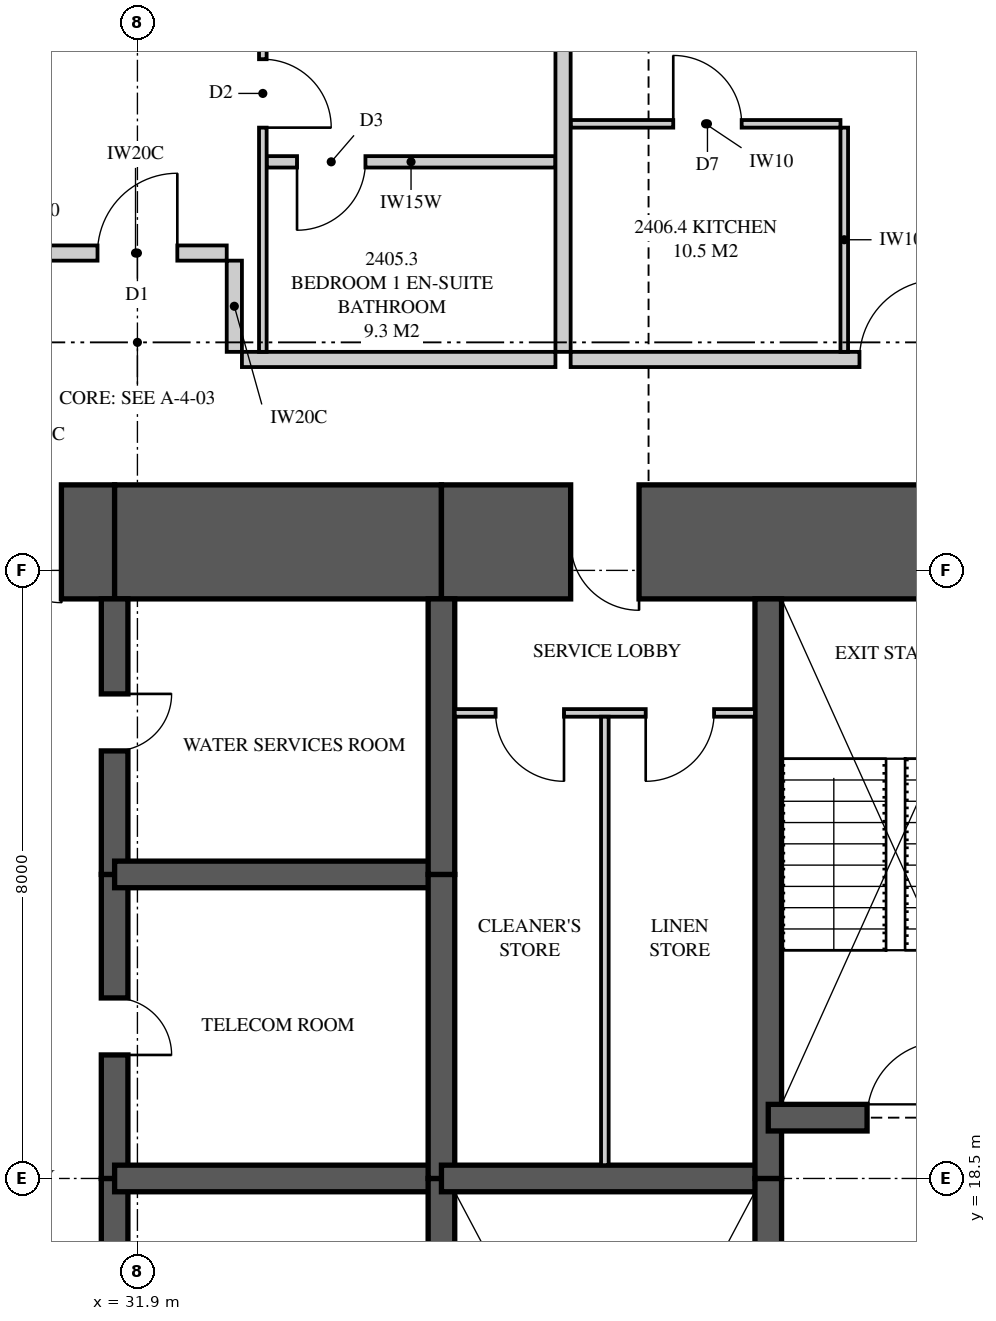
"""IFC4 building model, lengths in metres.
Left out: names, types, materials, properties, quantities, classifications, styles, units other than length and angle.
Written with IfcOpenShell. Run it as: python <this file> out.ifc"""

import sys

from ifc_helpers import new_model, si_unit, direction, frame, frame_2d, origin, place, context, subcontext, project, spatial, polyline, rectangle, outline, extrude, element, fill, save


model = new_model("IFC4")
c1 = context("Model", 3, precision=1e-05, world=origin(), true_north=direction((0.0, 1.0)))
c2 = subcontext(c1, "Body", "Model", "MODEL_VIEW")
j1 = project(units=[si_unit("LENGTHUNIT", "METRE"), si_unit("PLANEANGLEUNIT", "RADIAN")], contexts=[c1])
p1 = place(None, origin())
s1 = spatial("IfcSite", under=j1, at=p1, CompositionType="ELEMENT")
p2 = place(p1, origin())
s2 = spatial("IfcBuilding", under=s1, at=p2, CompositionType="ELEMENT")
p3 = place(p2, frame((0.0, 0.0, 91.45)))
s3 = spatial("IfcBuildingStorey", under=s2, at=p3, CompositionType="ELEMENT", Elevation=91.45)
p4 = place(p3, frame((44.225, 26.875, 0.0), z_axis=(0.0, 0.0, 1.0), x_axis=(-1.0, 0.0, 0.0)))
e1 = element("IfcWall", 1, at=p4, inside=s3, PredefinedType="SHEAR", context=c2, shape_type="SweptSolid", body=[
    extrude(rectangle(XDim=8.325, YDim=1.5, at=frame_2d((4.163, 0.0))), origin(), (0.0, 0.0, 1.0), 3.35),
])
p5 = place(p4, frame((5.725, 0.0, 0.0)))
e2 = element("IfcOpeningElement", 2, at=p5, cuts=e1, PredefinedType="OPENING", context=c2, shape_type="SweptSolid", body=[
    extrude(rectangle(XDim=0.9, YDim=2.1, at=frame_2d((0.45, 1.05))), frame((0.0, 0.76, 0.0), z_axis=(0.0, -1.0, 0.0), x_axis=(1.0, 0.0, 0.0)), (0.0, 0.0, 1.0), 1.52),
])
p6 = place(p3, frame((35.9, 26.875, 0.0), z_axis=(0.0, 0.0, 1.0), x_axis=(-1.0, 0.0, 0.0)))
e3 = element("IfcWall", 3, at=p6, inside=s3, PredefinedType="SHEAR", context=c2, shape_type="SweptSolid", body=[
    extrude(rectangle(XDim=4.3, YDim=1.5, at=frame_2d((2.15, 0.0))), origin(), (0.0, 0.0, 1.0), 3.35),
])
p7 = place(p3, frame((31.6, 26.875, 0.0), z_axis=(0.0, 0.0, 1.0), x_axis=(-1.0, 0.0, 0.0)))
e4 = element("IfcWall", 4, at=p7, inside=s3, PredefinedType="SHEAR", context=c2, shape_type="SweptSolid", body=[
    extrude(rectangle(XDim=5.6, YDim=1.5, at=frame_2d((2.8, 0.0))), origin(), (0.0, 0.0, 1.0), 3.35),
])
p8 = place(p7, frame((0.7, 0.0, 0.0)))
e5 = element("IfcOpeningElement", 5, at=p8, cuts=e4, PredefinedType="OPENING", context=c2, shape_type="SweptSolid", body=[
    extrude(rectangle(XDim=1.6, YDim=2.1, at=frame_2d((0.8, 1.05))), frame((0.0, 0.76, 0.0), z_axis=(0.0, -1.0, 0.0), x_axis=(1.0, 0.0, 0.0)), (0.0, 0.0, 1.0), 1.52),
])
p9 = place(p3, frame((31.6, 14.5, 0.0), z_axis=(0.0, 0.0, 1.0), x_axis=(0.0, 1.0, 0.0)))
e6 = element("IfcWall", 6, at=p9, inside=s3, PredefinedType="SHEAR", context=c2, shape_type="SweptSolid", body=[
    extrude(rectangle(XDim=4.0, YDim=0.35, at=frame_2d((2.0, 0.0))), origin(), (0.0, 0.0, 1.0), 3.35),
])
p10 = place(p9, frame((1.625, 0.0, 0.0)))
e7 = element("IfcOpeningElement", 7, at=p10, cuts=e6, PredefinedType="OPENING", context=c2, shape_type="SweptSolid", body=[
    extrude(rectangle(XDim=0.75, YDim=2.1, at=frame_2d((0.375, 1.05))), frame((0.0, 0.185, 0.0), z_axis=(0.0, -1.0, 0.0), x_axis=(1.0, 0.0, 0.0)), (0.0, 0.0, 1.0), 0.37),
])
p11 = place(p3, frame((31.6, 18.5, 0.0), z_axis=(0.0, 0.0, 1.0), x_axis=(0.0, 1.0, 0.0)))
e8 = element("IfcWall", 8, at=p11, inside=s3, PredefinedType="SHEAR", context=c2, shape_type="SweptSolid", body=[
    extrude(rectangle(XDim=4.0, YDim=0.35, at=frame_2d((2.0, 0.0))), origin(), (0.0, 0.0, 1.0), 3.35),
])
p12 = place(p11, frame((1.625, 0.0, 0.0)))
e9 = element("IfcOpeningElement", 9, at=p12, cuts=e8, PredefinedType="OPENING", context=c2, shape_type="SweptSolid", body=[
    extrude(rectangle(XDim=0.75, YDim=2.1, at=frame_2d((0.375, 1.05))), frame((0.0, 0.185, 0.0), z_axis=(0.0, -1.0, 0.0), x_axis=(1.0, 0.0, 0.0)), (0.0, 0.0, 1.0), 0.37),
])
p13 = place(p3, frame((31.6, 22.5, 0.0), z_axis=(0.0, 0.0, 1.0), x_axis=(0.0, 1.0, 0.0)))
e10 = element("IfcWall", 10, at=p13, inside=s3, PredefinedType="SHEAR", context=c2, shape_type="SweptSolid", body=[
    extrude(rectangle(XDim=3.625, YDim=0.35, at=frame_2d((1.812, 0.0))), origin(), (0.0, 0.0, 1.0), 3.35),
])
p14 = place(p13, frame((1.625, 0.0, 0.0)))
e11 = element("IfcOpeningElement", 11, at=p14, cuts=e10, PredefinedType="OPENING", context=c2, shape_type="SweptSolid", body=[
    extrude(rectangle(XDim=0.75, YDim=2.1, at=frame_2d((0.375, 1.05))), frame((0.0, 0.185, 0.0), z_axis=(0.0, -1.0, 0.0), x_axis=(1.0, 0.0, 0.0)), (0.0, 0.0, 1.0), 0.37),
])
for number, where, z_axis, x_axis in (
    (12, (35.9, 14.5, 0.0), (0.0, 0.0, 1.0), (0.0, 1.0, 0.0)),
    (13, (35.9, 18.5, 0.0), (0.0, 0.0, 1.0), (0.0, 1.0, 0.0)),
):
    element("IfcWall", number, at=place(p3, frame(where, z_axis=z_axis, x_axis=x_axis)), inside=s3, PredefinedType="SHEAR", context=c2, shape_type="SweptSolid", body=[
        extrude(rectangle(XDim=4.0, YDim=0.35, at=frame_2d((2.0, 0.0))), origin(), (0.0, 0.0, 1.0), 3.35),
    ])
p15 = place(p3, frame((35.9, 22.5, 0.0), z_axis=(0.0, 0.0, 1.0), x_axis=(0.0, 1.0, 0.0)))
e14 = element("IfcWall", 14, at=p15, inside=s3, PredefinedType="SHEAR", context=c2, shape_type="SweptSolid", body=[
    extrude(rectangle(XDim=3.625, YDim=0.35, at=frame_2d((1.812, 0.0))), origin(), (0.0, 0.0, 1.0), 3.35),
])
p16 = place(p3, frame((40.2, 13.7, 0.0), z_axis=(0.0, 0.0, 1.0), x_axis=(0.0, 1.0, 0.0)))
e15 = element("IfcWall", 15, at=p16, inside=s3, PredefinedType="SHEAR", context=c2, shape_type="SweptSolid", body=[
    extrude(rectangle(XDim=4.8, YDim=0.35, at=frame_2d((2.4, 0.0))), origin(), (0.0, 0.0, 1.0), 3.35),
])
p17 = place(p3, frame((40.2, 18.5, 0.0), z_axis=(0.0, 0.0, 1.0), x_axis=(0.0, 1.0, 0.0)))
e16 = element("IfcWall", 16, at=p17, inside=s3, PredefinedType="SHEAR", context=c2, shape_type="SweptSolid", body=[
    extrude(rectangle(XDim=7.625, YDim=0.35, at=frame_2d((3.812, 0.0))), origin(), (0.0, 0.0, 1.0), 3.35),
])
for number, where, z_axis, x_axis in (
    (17, (31.6, 18.5, 0.0), (0.0, 0.0, 1.0), (1.0, 0.0, 0.0)),
    (18, (31.6, 22.5, 0.0), (0.0, 0.0, 1.0), (1.0, 0.0, 0.0)),
):
    element("IfcWall", number, at=place(p3, frame(where, z_axis=z_axis, x_axis=x_axis)), inside=s3, PredefinedType="SHEAR", context=c2, shape_type="SweptSolid", body=[
        extrude(rectangle(XDim=4.3, YDim=0.35, at=frame_2d((2.15, 0.0))), origin(), (0.0, 0.0, 1.0), 3.35),
    ])
p18 = place(p3, frame((35.9, 18.5, 0.0), z_axis=(0.0, 0.0, 1.0), x_axis=(1.0, 0.0, 0.0)))
e19 = element("IfcWall", 19, at=p18, inside=s3, PredefinedType="SHEAR", context=c2, shape_type="SweptSolid", body=[
    extrude(rectangle(XDim=4.3, YDim=0.35, at=frame_2d((2.15, 0.0))), origin(), (0.0, 0.0, 1.0), 3.35),
])
p19 = place(p3, frame((40.2, 19.3, 0.0), z_axis=(0.0, 0.0, 1.0), x_axis=(1.0, 0.0, 0.0)))
e20 = element("IfcWall", 20, at=p19, inside=s3, PredefinedType="SHEAR", context=c2, shape_type="SweptSolid", body=[
    extrude(rectangle(XDim=3.6, YDim=0.35, at=frame_2d((1.8, 0.0))), origin(), (0.0, 0.0, 1.0), 3.35),
])
p20 = place(p19, frame((1.3, 0.0, 0.0)))
e21 = element("IfcOpeningElement", 21, at=p20, cuts=e20, PredefinedType="OPENING", context=c2, shape_type="SweptSolid", body=[
    extrude(rectangle(XDim=1.0, YDim=2.1, at=frame_2d((0.5, 1.05))), frame((0.0, 0.185, 0.0), z_axis=(0.0, -1.0, 0.0), x_axis=(1.0, 0.0, 0.0)), (0.0, 0.0, 1.0), 0.37),
])
p21 = place(p3, frame((37.5, 37.825, 0.0), z_axis=(0.0, 0.0, 1.0), x_axis=(0.0, -1.0, 0.0)))
e22 = element("IfcWall", 22, at=p21, inside=s3, PredefinedType="PARTITIONING", context=c2, shape_type="SweptSolid", body=[
    extrude(outline(polyline([(0.529, 2.15), (0.0, 2.15), (0.0, 0.0), (0.529, 0.0), (0.529, 0.735), (1.021, 0.735), (1.021, 0.0), (8.45, 0.0), (8.45, 3.11), (1.685, 3.11), (1.685, 2.15), (1.021, 2.15), (1.021, 1.415), (0.529, 1.415), (0.529, 2.15)])), frame((0.0, 0.1, 0.0), z_axis=(0.0, -1.0, 0.0), x_axis=(1.0, 0.0, 0.0)), (0.0, 0.0, 1.0), 0.2),
])
p22 = place(p3, frame((33.55, 37.825, 0.0), z_axis=(0.0, 0.0, 1.0), x_axis=(0.0, -1.0, 0.0)))
e23 = element("IfcWall", 23, at=p22, inside=s3, PredefinedType="PARTITIONING", context=c2, shape_type="SweptSolid", body=[
    extrude(outline(polyline([(0.0, 0.0), (8.45, 0.0), (8.45, 3.11), (1.635, 3.11), (1.635, 2.15), (0.0, 2.15), (0.0, 3.11), (0.0, 0.0)])), frame((0.0, 0.05, 0.0), z_axis=(0.0, -1.0, 0.0), x_axis=(1.0, 0.0, 0.0)), (0.0, 0.0, 1.0), 0.1),
])
p23 = place(p22, frame((4.6, 0.0, 0.0)))
e24 = element("IfcOpeningElement", 24, at=p23, cuts=e23, PredefinedType="OPENING", context=c2, shape_type="SweptSolid", body=[
    extrude(rectangle(XDim=0.9, YDim=2.1, at=frame_2d((0.45, 1.05))), frame((0.0, 0.06, 0.0), z_axis=(0.0, -1.0, 0.0), x_axis=(1.0, 0.0, 0.0)), (0.0, 0.0, 1.0), 0.12),
])
p24 = place(p3, frame((33.6, 31.875, 0.0), z_axis=(0.0, 0.0, 1.0), x_axis=(1.0, 0.0, 0.0)))
e25 = element("IfcWall", 25, at=p24, inside=s3, PredefinedType="PLUMBINGWALL", context=c2, shape_type="SweptSolid", body=[
    extrude(rectangle(XDim=3.8, YDim=0.15, at=frame_2d((1.9, 0.0))), origin(), (0.0, 0.0, 1.0), 3.11),
])
p25 = place(p24, frame((0.4, 0.0, 0.0)))
e26 = element("IfcOpeningElement", 26, at=p25, cuts=e25, PredefinedType="OPENING", context=c2, shape_type="SweptSolid", body=[
    extrude(rectangle(XDim=0.9, YDim=2.1, at=frame_2d((0.45, 1.05))), frame((0.0, 0.085, 0.0), z_axis=(0.0, -1.0, 0.0), x_axis=(1.0, 0.0, 0.0)), (0.0, 0.0, 1.0), 0.17),
])
p26 = place(p3, frame((37.6, 29.275, 0.0), z_axis=(0.0, 0.0, 1.0), x_axis=(1.0, 0.0, 0.0)))
e27 = element("IfcWall", 27, at=p26, inside=s3, PredefinedType="PARTITIONING", context=c2, shape_type="SweptSolid", body=[
    extrude(outline(polyline([(0.0, 0.0), (8.425, 0.0), (8.425, 3.11), (1.362, 3.11), (1.362, 2.541), (0.688, 2.541), (0.688, 3.11), (0.0, 3.11), (0.0, 0.0)])), frame((0.0, 0.1, 0.0), z_axis=(0.0, -1.0, 0.0), x_axis=(1.0, 0.0, 0.0)), (0.0, 0.0, 1.0), 0.2),
])
p27 = place(p26, frame((3.8, 0.0, 0.0)))
e28 = element("IfcOpeningElement", 28, at=p27, cuts=e27, PredefinedType="OPENING", context=c2, shape_type="SweptSolid", body=[
    extrude(rectangle(XDim=1.05, YDim=2.2, at=frame_2d((0.525, 1.1))), frame((0.0, 0.11, 0.0), z_axis=(0.0, -1.0, 0.0), x_axis=(1.0, 0.0, 0.0)), (0.0, 0.0, 1.0), 0.22),
])
p28 = place(p3, frame((37.6, 32.375, 0.0), z_axis=(0.0, 0.0, 1.0), x_axis=(1.0, 0.0, 0.0)))
e29 = element("IfcWall", 29, at=p28, inside=s3, PredefinedType="PARTITIONING", context=c2, shape_type="SweptSolid", body=[
    extrude(outline(polyline([(0.0, 0.0), (3.55, 0.0), (3.55, 3.11), (1.312, 3.11), (1.312, 2.541), (0.738, 2.541), (0.738, 3.11), (0.0, 3.11), (0.0, 0.0)])), frame((0.0, 0.05, 0.0), z_axis=(0.0, -1.0, 0.0), x_axis=(1.0, 0.0, 0.0)), (0.0, 0.0, 1.0), 0.1),
])
p29 = place(p28, frame((1.35, 0.0, 0.0)))
e30 = element("IfcOpeningElement", 30, at=p29, cuts=e29, PredefinedType="OPENING", context=c2, shape_type="SweptSolid", body=[
    extrude(rectangle(XDim=0.9, YDim=2.1, at=frame_2d((0.45, 1.05))), frame((0.0, 0.06, 0.0), z_axis=(0.0, -1.0, 0.0), x_axis=(1.0, 0.0, 0.0)), (0.0, 0.0, 1.0), 0.12),
])
p30 = place(p3, frame((41.2, 32.325, 0.0), z_axis=(0.0, 0.0, 1.0), x_axis=(0.0, -1.0, 0.0)))
e31 = element("IfcWall", 31, at=p30, inside=s3, PredefinedType="PARTITIONING", context=c2, shape_type="SweptSolid", body=[
    extrude(rectangle(XDim=2.95, YDim=0.1, at=frame_2d((1.475, 0.0))), origin(), (0.0, 0.0, 1.0), 3.11),
])
p31 = place(p3, frame((33.275, 29.275, 0.0), z_axis=(0.0, 0.0, 1.0), x_axis=(1.0, 0.0, 0.0)))
e32 = element("IfcWall", 32, at=p31, inside=s3, PredefinedType="PARTITIONING", context=c2, shape_type="SweptSolid", body=[
    extrude(rectangle(XDim=4.125, YDim=0.2, at=frame_2d((2.062, 0.0))), origin(), (0.0, 0.0, 1.0), 3.11),
])
p32 = place(p3, frame((30.675, 30.675, 0.0), z_axis=(0.0, 0.0, 1.0), x_axis=(1.0, 0.0, 0.0)))
e33 = element("IfcWall", 33, at=p32, inside=s3, PredefinedType="PARTITIONING", context=c2, shape_type="SweptSolid", body=[
    extrude(rectangle(XDim=2.4, YDim=0.2, at=frame_2d((1.2, 0.0))), origin(), (0.0, 0.0, 1.0), 3.11),
])
p33 = place(p32, frame((0.7, 0.0, 0.0)))
e34 = element("IfcOpeningElement", 34, at=p33, cuts=e33, PredefinedType="OPENING", context=c2, shape_type="SweptSolid", body=[
    extrude(rectangle(XDim=1.05, YDim=2.2, at=frame_2d((0.525, 1.1))), frame((0.0, 0.11, 0.0), z_axis=(0.0, -1.0, 0.0), x_axis=(1.0, 0.0, 0.0)), (0.0, 0.0, 1.0), 0.22),
])
p34 = place(p3, frame((33.175, 29.375, 0.0), z_axis=(0.0, 0.0, 1.0), x_axis=(0.0, 1.0, 0.0)))
e35 = element("IfcWall", 35, at=p34, inside=s3, PredefinedType="PARTITIONING", context=c2, shape_type="SweptSolid", body=[
    extrude(rectangle(XDim=1.2, YDim=0.2, at=frame_2d((0.6, 0.0))), origin(), (0.0, 0.0, 1.0), 3.11),
])
p35 = place(p3, frame((36.075, 24.625, 0.0), z_axis=(0.0, 0.0, 1.0), x_axis=(1.0, 0.0, 0.0)))
e36 = element("IfcWall", 36, at=p35, inside=s3, PredefinedType="PARTITIONING", context=c2, shape_type="SweptSolid", body=[
    extrude(rectangle(XDim=3.95, YDim=0.1, at=frame_2d((1.975, 0.0))), origin(), (0.0, 0.0, 1.0), 3.11),
])
p36 = place(p35, frame((0.538, 0.0, 0.0)))
e37 = element("IfcOpeningElement", 37, at=p36, cuts=e36, PredefinedType="OPENING", context=c2, shape_type="SweptSolid", body=[
    extrude(rectangle(XDim=0.9, YDim=2.1, at=frame_2d((0.45, 1.05))), frame((0.0, 0.06, 0.0), z_axis=(0.0, -1.0, 0.0), x_axis=(1.0, 0.0, 0.0)), (0.0, 0.0, 1.0), 0.12),
])
p37 = place(p35, frame((2.512, 0.0, 0.0)))
e38 = element("IfcOpeningElement", 38, at=p37, cuts=e36, PredefinedType="OPENING", context=c2, shape_type="SweptSolid", body=[
    extrude(rectangle(XDim=0.9, YDim=2.1, at=frame_2d((0.45, 1.05))), frame((0.0, 0.06, 0.0), z_axis=(0.0, -1.0, 0.0), x_axis=(1.0, 0.0, 0.0)), (0.0, 0.0, 1.0), 0.12),
])
p38 = place(p3, frame((38.05, 18.675, 0.0), z_axis=(0.0, 0.0, 1.0), x_axis=(0.0, 1.0, 0.0)))
e39 = element("IfcWall", 39, at=p38, inside=s3, PredefinedType="PARTITIONING", context=c2, shape_type="SweptSolid", body=[
    extrude(rectangle(XDim=5.9, YDim=0.1, at=frame_2d((2.95, 0.0))), origin(), (0.0, 0.0, 1.0), 3.11),
])
p39 = place(p33, origin())
e40 = element("IfcDoor", 40, at=p39, inside=s3, OperationType="SINGLE_SWING_RIGHT", PredefinedType="DOOR", context=c2, shape_type="SweptSolid", body=[
    extrude(rectangle(XDim=1.05, YDim=2.2, at=frame_2d((0.525, 1.1))), frame((0.0, 0.025, 0.0), z_axis=(0.0, -1.0, 0.0), x_axis=(1.0, 0.0, 0.0)), (0.0, 0.0, 1.0), 0.05),
])
fill(e34, e40)
p40 = place(p23, origin())
e41 = element("IfcDoor", 41, at=p40, inside=s3, OperationType="SINGLE_SWING_RIGHT", PredefinedType="DOOR", context=c2, shape_type="SweptSolid", body=[
    extrude(rectangle(XDim=0.9, YDim=2.1, at=frame_2d((0.45, 1.05))), frame((0.0, 0.025, 0.0), z_axis=(0.0, -1.0, 0.0), x_axis=(1.0, 0.0, 0.0)), (0.0, 0.0, 1.0), 0.05),
])
fill(e24, e41)
p41 = place(p25, frame((0.9, 0.0, 0.0), z_axis=(0.0, 0.0, 1.0), x_axis=(-1.0, 0.0, 0.0)))
e42 = element("IfcDoor", 42, at=p41, inside=s3, OperationType="SINGLE_SWING_RIGHT", PredefinedType="DOOR", context=c2, shape_type="SweptSolid", body=[
    extrude(rectangle(XDim=0.9, YDim=2.1, at=frame_2d((0.45, 1.05))), frame((0.0, 0.025, 0.0), z_axis=(0.0, -1.0, 0.0), x_axis=(1.0, 0.0, 0.0)), (0.0, 0.0, 1.0), 0.05),
])
fill(e26, e42)
p42 = place(p27, origin())
e43 = element("IfcDoor", 43, at=p42, inside=s3, OperationType="SINGLE_SWING_RIGHT", PredefinedType="DOOR", context=c2, shape_type="SweptSolid", body=[
    extrude(rectangle(XDim=1.05, YDim=2.2, at=frame_2d((0.525, 1.1))), frame((0.0, 0.025, 0.0), z_axis=(0.0, -1.0, 0.0), x_axis=(1.0, 0.0, 0.0)), (0.0, 0.0, 1.0), 0.05),
])
fill(e28, e43)
p43 = place(p29, origin())
e44 = element("IfcDoor", 44, at=p43, inside=s3, OperationType="SINGLE_SWING_LEFT", PredefinedType="DOOR", context=c2, shape_type="SweptSolid", body=[
    extrude(rectangle(XDim=0.9, YDim=2.1, at=frame_2d((0.45, 1.05))), frame((0.0, 0.025, 0.0), z_axis=(0.0, -1.0, 0.0), x_axis=(1.0, 0.0, 0.0)), (0.0, 0.0, 1.0), 0.05),
])
fill(e30, e44)
p44 = place(p36, frame((0.9, 0.0, 0.0), z_axis=(0.0, 0.0, 1.0), x_axis=(-1.0, 0.0, 0.0)))
e45 = element("IfcDoor", 45, at=p44, inside=s3, OperationType="SINGLE_SWING_LEFT", PredefinedType="DOOR", context=c2, shape_type="SweptSolid", body=[
    extrude(rectangle(XDim=0.9, YDim=2.1, at=frame_2d((0.45, 1.05))), frame((0.0, 0.025, 0.0), z_axis=(0.0, -1.0, 0.0), x_axis=(1.0, 0.0, 0.0)), (0.0, 0.0, 1.0), 0.05),
])
fill(e37, e45)
p45 = place(p37, frame((0.9, 0.0, 0.0), z_axis=(0.0, 0.0, 1.0), x_axis=(-1.0, 0.0, 0.0)))
e46 = element("IfcDoor", 46, at=p45, inside=s3, OperationType="SINGLE_SWING_RIGHT", PredefinedType="DOOR", context=c2, shape_type="SweptSolid", body=[
    extrude(rectangle(XDim=0.9, YDim=2.1, at=frame_2d((0.45, 1.05))), frame((0.0, 0.025, 0.0), z_axis=(0.0, -1.0, 0.0), x_axis=(1.0, 0.0, 0.0)), (0.0, 0.0, 1.0), 0.05),
])
fill(e38, e46)
p46 = place(p20, origin())
e47 = element("IfcDoor", 47, at=p46, inside=s3, OperationType="SINGLE_SWING_RIGHT", PredefinedType="DOOR", context=c2, shape_type="SweptSolid", body=[
    extrude(rectangle(XDim=1.0, YDim=2.1, at=frame_2d((0.5, 1.05))), frame((0.0, 0.025, 0.0), z_axis=(0.0, -1.0, 0.0), x_axis=(1.0, 0.0, 0.0)), (0.0, 0.0, 1.0), 0.05),
])
fill(e21, e47)
p47 = place(p8, origin())
e48 = element("IfcDoor", 48, at=p47, inside=s3, OperationType="DOUBLE_DOOR_SINGLE_SWING", PredefinedType="DOOR", context=c2, shape_type="SweptSolid", body=[
    extrude(rectangle(XDim=1.6, YDim=2.1, at=frame_2d((0.8, 1.05))), frame((0.0, 0.025, 0.0), z_axis=(0.0, -1.0, 0.0), x_axis=(1.0, 0.0, 0.0)), (0.0, 0.0, 1.0), 0.05),
])
fill(e5, e48)
p48 = place(p12, frame((0.75, 0.0, 0.0), z_axis=(0.0, 0.0, 1.0), x_axis=(-1.0, 0.0, 0.0)))
e49 = element("IfcDoor", 49, at=p48, inside=s3, OperationType="SINGLE_SWING_RIGHT", PredefinedType="DOOR", context=c2, shape_type="SweptSolid", body=[
    extrude(rectangle(XDim=0.75, YDim=2.1, at=frame_2d((0.375, 1.05))), frame((0.0, 0.025, 0.0), z_axis=(0.0, -1.0, 0.0), x_axis=(1.0, 0.0, 0.0)), (0.0, 0.0, 1.0), 0.05),
])
fill(e9, e49)
p49 = place(p14, frame((0.75, 0.0, 0.0), z_axis=(0.0, 0.0, 1.0), x_axis=(-1.0, 0.0, 0.0)))
e50 = element("IfcDoor", 50, at=p49, inside=s3, OperationType="SINGLE_SWING_LEFT", PredefinedType="DOOR", context=c2, shape_type="SweptSolid", body=[
    extrude(rectangle(XDim=0.75, YDim=2.1, at=frame_2d((0.375, 1.05))), frame((0.0, 0.025, 0.0), z_axis=(0.0, -1.0, 0.0), x_axis=(1.0, 0.0, 0.0)), (0.0, 0.0, 1.0), 0.05),
])
fill(e11, e50)
p50 = place(p5, origin())
e51 = element("IfcDoor", 51, at=p50, inside=s3, OperationType="SINGLE_SWING_LEFT", PredefinedType="DOOR", context=c2, shape_type="SweptSolid", body=[
    extrude(rectangle(XDim=0.9, YDim=2.1, at=frame_2d((0.45, 1.05))), frame((0.0, 0.47, 0.0), z_axis=(0.0, -1.0, 0.0), x_axis=(1.0, 0.0, 0.0)), (0.0, 0.0, 1.0), 0.8),
])
fill(e2, e51)
save(model, sys.argv[1])
